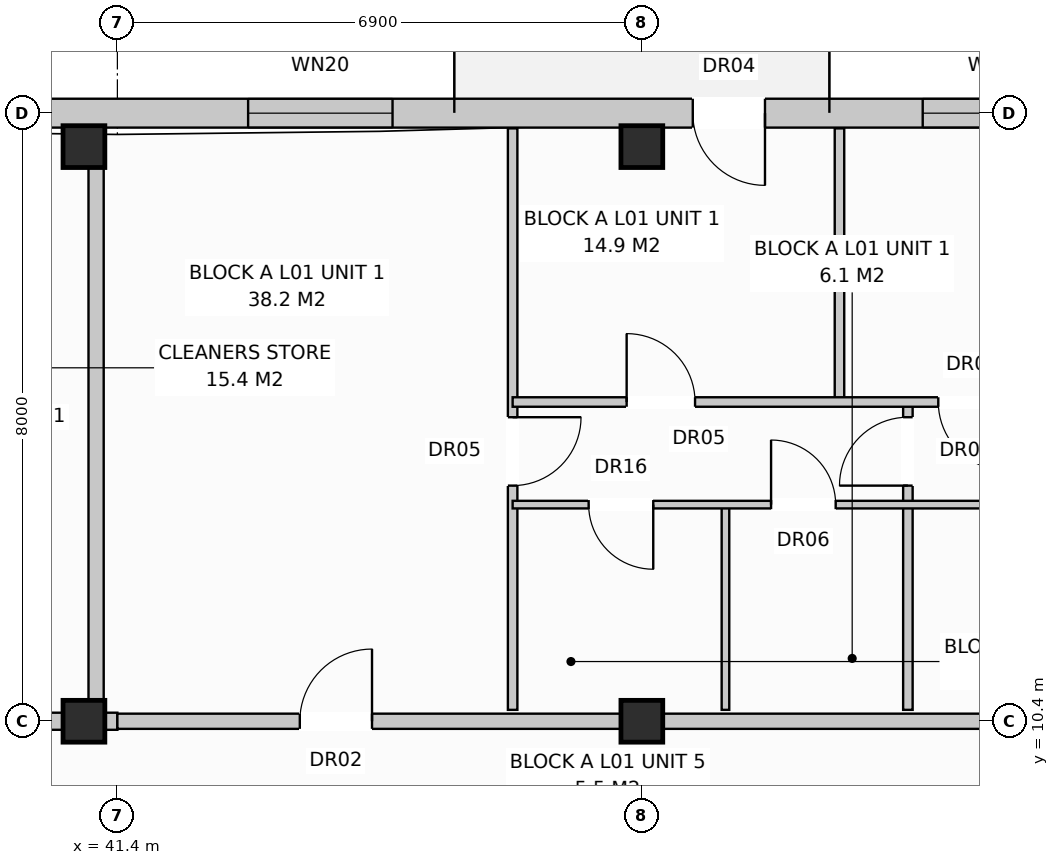
"""IFC4 building model, lengths in metres.
Left out: names, types, materials, properties, quantities, classifications, styles, units other than length and angle.
Written with IfcOpenShell. Run it as: python <this file> out.ifc"""

import sys

from ifc_helpers import new_model, si_unit, direction, frame, frame_2d, origin, origin_with_axes, origin_2d, place, context, subcontext, project, spatial, rectangle, extrude, element, fill, save


model = new_model("IFC4")
c1 = context("Model", 3, precision=1e-05, world=origin(), true_north=direction((0.0, 1.0)))
c2 = subcontext(c1, "Body", "Model", "MODEL_VIEW")
j1 = project(units=[si_unit("LENGTHUNIT", "METRE"), si_unit("PLANEANGLEUNIT", "RADIAN")], contexts=[c1])
p1 = place(None, origin())
s1 = spatial("IfcSite", under=j1, at=p1, CompositionType="ELEMENT")
p2 = place(p1, origin())
s2 = spatial("IfcBuilding", under=s1, at=p2, CompositionType="ELEMENT")
p3 = place(p2, frame((0.0, 0.0, 4.4)))
s3 = spatial("IfcBuildingStorey", under=s2, at=p3, CompositionType="ELEMENT", Elevation=4.4)
for number, where, z_axis, x_axis in (
    (1, (40.96, 10.4, 0.0), (0.0, 0.0, 1.0), (1.0, 0.0, 0.0)),
    (2, (40.96, 17.96, 0.0), (0.0, 0.0, 1.0), (1.0, 0.0, 0.0)),
    (3, (48.3, 10.4, 0.0), (0.0, 0.0, 1.0), (1.0, 0.0, 0.0)),
    (4, (48.3, 17.96, 0.0), (0.0, 0.0, 1.0), (1.0, 0.0, 0.0)),
):
    element("IfcColumn", number, at=place(p3, frame(where, z_axis=z_axis, x_axis=x_axis)), inside=s3, PredefinedType="COLUMN", context=c2, shape_type="SweptSolid", body=[
        extrude(rectangle(XDim=0.55, YDim=0.55, at=origin_2d()), origin(), (0.0, 0.0, 1.0), 3.6),
    ])
p4 = place(p3, frame((31.35, 18.4, 0.0), z_axis=(0.0, 0.0, 1.0), x_axis=(1.0, 0.0, 0.0)))
e5 = element("IfcWall", 5, at=p4, inside=s3, PredefinedType="STANDARD", context=c2, shape_type="SweptSolid", body=[
    extrude(rectangle(XDim=23.67, YDim=0.38, at=frame_2d((11.835, 0.0))), origin(), (0.0, 0.0, 1.0), 3.33),
])
p5 = place(p4, frame((17.62, 0.0, 0.0)))
e6 = element("IfcOpeningElement", 6, at=p5, cuts=e5, PredefinedType="OPENING", context=c2, shape_type="SweptSolid", body=[
    extrude(rectangle(XDim=0.95, YDim=2.1, at=frame_2d((0.475, 1.05))), frame((0.0, 0.202, 0.0), z_axis=(0.0, -1.0, 0.0), x_axis=(1.0, 0.0, 0.0)), (0.0, 0.0, 1.0), 0.404),
])
p6 = place(p4, frame((11.77, 0.0, 0.8)))
e7 = element("IfcOpeningElement", 7, at=p6, cuts=e5, PredefinedType="OPENING", context=c2, shape_type="SweptSolid", body=[
    extrude(rectangle(XDim=1.9, YDim=1.85, at=frame_2d((0.95, 0.925))), frame((0.0, 0.202, 0.0), z_axis=(0.0, -1.0, 0.0), x_axis=(1.0, 0.0, 0.0)), (0.0, 0.0, 1.0), 0.404),
])
p7 = place(p4, frame((20.645, 0.0, 0.8)))
e8 = element("IfcOpeningElement", 8, at=p7, cuts=e5, PredefinedType="OPENING", context=c2, shape_type="SweptSolid", body=[
    extrude(rectangle(XDim=1.95, YDim=1.65, at=frame_2d((0.975, 0.825))), frame((0.0, 0.202, 0.0), z_axis=(0.0, -1.0, 0.0), x_axis=(1.0, 0.0, 0.0)), (0.0, 0.0, 1.0), 0.404),
])
p8 = place(p3, frame((41.12, 10.6, 0.0), z_axis=(0.0, 0.0, 1.0), x_axis=(0.0, 1.0, 0.0)))
e9 = element("IfcWall", 9, at=p8, inside=s3, PredefinedType="PARTITIONING", context=c2, shape_type="SweptSolid", body=[
    extrude(rectangle(XDim=7.6, YDim=0.2, at=frame_2d((3.8, 0.0))), origin(), (0.0, 0.0, 1.0), 3.33),
])
p9 = place(p3, frame((31.5, 10.4, 0.0), z_axis=(0.0, 0.0, 1.0), x_axis=(1.0, 0.0, 0.0)))
e10 = element("IfcWall", 10, at=p9, inside=s3, PredefinedType="PARTITIONING", context=c2, shape_type="SweptSolid", body=[
    extrude(rectangle(XDim=9.9, YDim=0.225, at=frame_2d((4.95, 0.0))), origin(), (0.0, 0.0, 1.0), 2.77),
])
p10 = place(p9, frame((0.475, 0.0, 0.0)))
e11 = element("IfcOpeningElement", 11, at=p10, cuts=e10, PredefinedType="OPENING", context=c2, shape_type="SweptSolid", body=[
    extrude(rectangle(XDim=1.1, YDim=2.15, at=frame_2d((0.55, 1.075))), frame((0.0, 0.125, 0.0), z_axis=(0.0, -1.0, 0.0), x_axis=(1.0, 0.0, 0.0)), (0.0, 0.0, 1.0), 0.249),
])
p11 = place(p9, frame((5.75, 0.0, 0.0)))
e12 = element("IfcOpeningElement", 12, at=p11, cuts=e10, PredefinedType="OPENING", context=c2, shape_type="SweptSolid", body=[
    extrude(rectangle(XDim=0.9, YDim=2.1, at=frame_2d((0.45, 1.05))), frame((0.0, 0.125, 0.0), z_axis=(0.0, -1.0, 0.0), x_axis=(1.0, 0.0, 0.0)), (0.0, 0.0, 1.0), 0.249),
])
p12 = place(p9, frame((7.8, 0.0, 0.0)))
e13 = element("IfcOpeningElement", 13, at=p12, cuts=e10, PredefinedType="OPENING", context=c2, shape_type="SweptSolid", body=[
    extrude(rectangle(XDim=0.95, YDim=2.15, at=frame_2d((0.475, 1.075))), frame((0.0, 0.125, 0.0), z_axis=(0.0, -1.0, 0.0), x_axis=(1.0, 0.0, 0.0)), (0.0, 0.0, 1.0), 0.249),
])
p13 = place(p3, frame((41.4, 10.4, 0.0), z_axis=(0.0, 0.0, 1.0), x_axis=(1.0, 0.0, 0.0)))
e14 = element("IfcWall", 14, at=p13, inside=s3, PredefinedType="PARTITIONING", context=c2, shape_type="SweptSolid", body=[
    extrude(rectangle(XDim=13.8, YDim=0.2, at=frame_2d((6.9, 0.0))), origin(), (0.0, 0.0, 1.0), 2.77),
])
p14 = place(p13, frame((2.4, 0.0, 0.0)))
e15 = element("IfcOpeningElement", 15, at=p14, cuts=e14, PredefinedType="OPENING", context=c2, shape_type="SweptSolid", body=[
    extrude(rectangle(XDim=0.95, YDim=2.15, at=frame_2d((0.475, 1.075))), frame((0.0, 0.112, 0.0), z_axis=(0.0, -1.0, 0.0), x_axis=(1.0, 0.0, 0.0)), (0.0, 0.0, 1.0), 0.224),
])
p15 = place(p3, frame((46.6, 10.55, 0.0), z_axis=(0.0, 0.0, 1.0), x_axis=(0.0, 1.0, 0.0)))
e16 = element("IfcWall", 16, at=p15, inside=s3, PredefinedType="PARTITIONING", context=c2, shape_type="SweptSolid", body=[
    extrude(rectangle(XDim=7.65, YDim=0.125, at=frame_2d((3.825, 0.0))), origin(), (0.0, 0.0, 1.0), 3.33),
])
p16 = place(p15, frame((2.95, 0.0, 0.0)))
e17 = element("IfcOpeningElement", 17, at=p16, cuts=e16, PredefinedType="OPENING", context=c2, shape_type="SweptSolid", body=[
    extrude(rectangle(XDim=0.9, YDim=2.1, at=frame_2d((0.45, 1.05))), frame((0.0, 0.074, 0.0), z_axis=(0.0, -1.0, 0.0), x_axis=(1.0, 0.0, 0.0)), (0.0, 0.0, 1.0), 0.149),
])
p17 = place(p3, frame((49.4, 10.55, 0.0), z_axis=(0.0, 0.0, 1.0), x_axis=(0.0, 1.0, 0.0)))
e18 = element("IfcWall", 18, at=p17, inside=s3, PredefinedType="PARTITIONING", context=c2, shape_type="SweptSolid", body=[
    extrude(rectangle(XDim=2.7, YDim=0.1, at=frame_2d((1.35, 0.0))), origin(), (0.0, 0.0, 1.0), 3.33),
])
p18 = place(p3, frame((51.8, 10.55, 0.0), z_axis=(0.0, 0.0, 1.0), x_axis=(0.0, 1.0, 0.0)))
e19 = element("IfcWall", 19, at=p18, inside=s3, PredefinedType="PARTITIONING", context=c2, shape_type="SweptSolid", body=[
    extrude(rectangle(XDim=4.05, YDim=0.125, at=frame_2d((2.025, 0.0))), origin(), (0.0, 0.0, 1.0), 3.33),
])
p19 = place(p18, frame((2.95, 0.0, 0.0)))
e20 = element("IfcOpeningElement", 20, at=p19, cuts=e19, PredefinedType="OPENING", context=c2, shape_type="SweptSolid", body=[
    extrude(rectangle(XDim=0.9, YDim=2.1, at=frame_2d((0.45, 1.05))), frame((0.0, 0.074, 0.0), z_axis=(0.0, -1.0, 0.0), x_axis=(1.0, 0.0, 0.0)), (0.0, 0.0, 1.0), 0.149),
])
p20 = place(p3, frame((50.9, 14.6, 0.0), z_axis=(0.0, 0.0, 1.0), x_axis=(0.0, 1.0, 0.0)))
e21 = element("IfcWall", 21, at=p20, inside=s3, PredefinedType="PARTITIONING", context=c2, shape_type="SweptSolid", body=[
    extrude(rectangle(XDim=3.6, YDim=0.125, at=frame_2d((1.8, 0.0))), origin(), (0.0, 0.0, 1.0), 3.33),
])
p21 = place(p3, frame((46.6, 13.25, 0.0), z_axis=(0.0, 0.0, 1.0), x_axis=(1.0, 0.0, 0.0)))
e22 = element("IfcWall", 22, at=p21, inside=s3, PredefinedType="PARTITIONING", context=c2, shape_type="SweptSolid", body=[
    extrude(rectangle(XDim=8.5, YDim=0.1, at=frame_2d((4.25, 0.0))), origin(), (0.0, 0.0, 1.0), 3.33),
])
p22 = place(p21, frame((1.0, 0.0, 0.0)))
e23 = element("IfcOpeningElement", 23, at=p22, cuts=e22, PredefinedType="OPENING", context=c2, shape_type="SweptSolid", body=[
    extrude(rectangle(XDim=0.85, YDim=2.1, at=frame_2d((0.425, 1.05))), frame((0.0, 0.062, 0.0), z_axis=(0.0, -1.0, 0.0), x_axis=(1.0, 0.0, 0.0)), (0.0, 0.0, 1.0), 0.124),
])
p23 = place(p21, frame((3.4, 0.0, 0.0)))
e24 = element("IfcOpeningElement", 24, at=p23, cuts=e22, PredefinedType="OPENING", context=c2, shape_type="SweptSolid", body=[
    extrude(rectangle(XDim=0.85, YDim=2.05, at=frame_2d((0.425, 1.025))), frame((0.0, 0.062, 0.0), z_axis=(0.0, -1.0, 0.0), x_axis=(1.0, 0.0, 0.0)), (0.0, 0.0, 1.0), 0.124),
])
p24 = place(p21, frame((6.2, 0.0, 0.0)))
e25 = element("IfcOpeningElement", 25, at=p24, cuts=e22, PredefinedType="OPENING", context=c2, shape_type="SweptSolid", body=[
    extrude(rectangle(XDim=0.85, YDim=2.05, at=frame_2d((0.425, 1.025))), frame((0.0, 0.062, 0.0), z_axis=(0.0, -1.0, 0.0), x_axis=(1.0, 0.0, 0.0)), (0.0, 0.0, 1.0), 0.124),
])
p25 = place(p3, frame((46.6, 14.6, 0.0), z_axis=(0.0, 0.0, 1.0), x_axis=(1.0, 0.0, 0.0)))
e26 = element("IfcWall", 26, at=p25, inside=s3, PredefinedType="PARTITIONING", context=c2, shape_type="SweptSolid", body=[
    extrude(rectangle(XDim=8.5, YDim=0.125, at=frame_2d((4.25, 0.0))), origin(), (0.0, 0.0, 1.0), 3.33),
])
p26 = place(p25, frame((1.5, 0.0, 0.0)))
e27 = element("IfcOpeningElement", 27, at=p26, cuts=e26, PredefinedType="OPENING", context=c2, shape_type="SweptSolid", body=[
    extrude(rectangle(XDim=0.9, YDim=2.1, at=frame_2d((0.45, 1.05))), frame((0.0, 0.074, 0.0), z_axis=(0.0, -1.0, 0.0), x_axis=(1.0, 0.0, 0.0)), (0.0, 0.0, 1.0), 0.149),
])
p27 = place(p25, frame((5.6, 0.0, 0.0)))
e28 = element("IfcOpeningElement", 28, at=p27, cuts=e26, PredefinedType="OPENING", context=c2, shape_type="SweptSolid", body=[
    extrude(rectangle(XDim=0.9, YDim=2.1, at=frame_2d((0.45, 1.05))), frame((0.0, 0.074, 0.0), z_axis=(0.0, -1.0, 0.0), x_axis=(1.0, 0.0, 0.0)), (0.0, 0.0, 1.0), 0.149),
])
p28 = place(p5, frame((0.95, 0.0, 0.0), z_axis=(0.0, 0.0, 1.0), x_axis=(-1.0, 0.0, 0.0)))
e29 = element("IfcDoor", 29, at=p28, inside=s3, OperationType="SINGLE_SWING_RIGHT", PredefinedType="DOOR", context=c2, shape_type="SweptSolid", body=[
    extrude(rectangle(XDim=0.95, YDim=2.1, at=frame_2d((0.475, 1.05))), frame((0.0, 0.025, 0.0), z_axis=(0.0, -1.0, 0.0), x_axis=(1.0, 0.0, 0.0)), (0.0, 0.0, 1.0), 0.05),
])
fill(e6, e29)
p29 = place(p6, origin_with_axes())
e30 = element("IfcWindow", 30, at=p29, inside=s3, PartitioningType="SINGLE_PANEL", PredefinedType="WINDOW", context=c2, shape_type="SweptSolid", body=[
    extrude(rectangle(XDim=1.9, YDim=1.85, at=frame_2d((0.95, 0.925))), frame((0.0, 0.03, 0.0), z_axis=(0.0, -1.0, 0.0), x_axis=(1.0, 0.0, 0.0)), (0.0, 0.0, 1.0), 0.06),
])
fill(e7, e30)
p30 = place(p7, origin_with_axes())
e31 = element("IfcWindow", 31, at=p30, inside=s3, PartitioningType="SINGLE_PANEL", PredefinedType="WINDOW", context=c2, shape_type="SweptSolid", body=[
    extrude(rectangle(XDim=1.95, YDim=1.65, at=frame_2d((0.975, 0.825))), frame((0.0, 0.03, 0.0), z_axis=(0.0, -1.0, 0.0), x_axis=(1.0, 0.0, 0.0)), (0.0, 0.0, 1.0), 0.06),
])
fill(e8, e31)
p31 = place(p14, origin_with_axes())
e32 = element("IfcDoor", 32, at=p31, inside=s3, OperationType="SINGLE_SWING_RIGHT", PredefinedType="DOOR", context=c2, shape_type="SweptSolid", body=[
    extrude(rectangle(XDim=0.95, YDim=2.15, at=frame_2d((0.475, 1.075))), frame((0.0, 0.025, 0.0), z_axis=(0.0, -1.0, 0.0), x_axis=(1.0, 0.0, 0.0)), (0.0, 0.0, 1.0), 0.05),
])
fill(e15, e32)
p32 = place(p16, frame((0.9, 0.0, 0.0), z_axis=(0.0, 0.0, 1.0), x_axis=(-1.0, 0.0, 0.0)))
e33 = element("IfcDoor", 33, at=p32, inside=s3, OperationType="SINGLE_SWING_RIGHT", PredefinedType="DOOR", context=c2, shape_type="SweptSolid", body=[
    extrude(rectangle(XDim=0.9, YDim=2.1, at=frame_2d((0.45, 1.05))), frame((0.0, 0.025, 0.0), z_axis=(0.0, -1.0, 0.0), x_axis=(1.0, 0.0, 0.0)), (0.0, 0.0, 1.0), 0.05),
])
fill(e17, e33)
p33 = place(p19, origin_with_axes())
e34 = element("IfcDoor", 34, at=p33, inside=s3, OperationType="SINGLE_SWING_LEFT", PredefinedType="DOOR", context=c2, shape_type="SweptSolid", body=[
    extrude(rectangle(XDim=0.9, YDim=2.1, at=frame_2d((0.45, 1.05))), frame((0.0, 0.025, 0.0), z_axis=(0.0, -1.0, 0.0), x_axis=(1.0, 0.0, 0.0)), (0.0, 0.0, 1.0), 0.05),
])
fill(e20, e34)
p34 = place(p22, frame((0.85, 0.0, 0.0), z_axis=(0.0, 0.0, 1.0), x_axis=(-1.0, 0.0, 0.0)))
e35 = element("IfcDoor", 35, at=p34, inside=s3, OperationType="SINGLE_SWING_RIGHT", PredefinedType="DOOR", context=c2, shape_type="SweptSolid", body=[
    extrude(rectangle(XDim=0.85, YDim=2.1, at=frame_2d((0.425, 1.05))), frame((0.0, 0.025, 0.0), z_axis=(0.0, -1.0, 0.0), x_axis=(1.0, 0.0, 0.0)), (0.0, 0.0, 1.0), 0.05),
])
fill(e23, e35)
p35 = place(p23, origin_with_axes())
e36 = element("IfcDoor", 36, at=p35, inside=s3, OperationType="SINGLE_SWING_LEFT", PredefinedType="DOOR", context=c2, shape_type="SweptSolid", body=[
    extrude(rectangle(XDim=0.85, YDim=2.05, at=frame_2d((0.425, 1.025))), frame((0.0, 0.025, 0.0), z_axis=(0.0, -1.0, 0.0), x_axis=(1.0, 0.0, 0.0)), (0.0, 0.0, 1.0), 0.05),
])
fill(e24, e36)
p36 = place(p26, origin_with_axes())
e37 = element("IfcDoor", 37, at=p36, inside=s3, OperationType="SINGLE_SWING_LEFT", PredefinedType="DOOR", context=c2, shape_type="SweptSolid", body=[
    extrude(rectangle(XDim=0.9, YDim=2.1, at=frame_2d((0.45, 1.05))), frame((0.0, 0.025, 0.0), z_axis=(0.0, -1.0, 0.0), x_axis=(1.0, 0.0, 0.0)), (0.0, 0.0, 1.0), 0.05),
])
fill(e27, e37)
p37 = place(p27, frame((0.9, 0.0, 0.0), z_axis=(0.0, 0.0, 1.0), x_axis=(-1.0, 0.0, 0.0)))
e38 = element("IfcDoor", 38, at=p37, inside=s3, OperationType="SINGLE_SWING_RIGHT", PredefinedType="DOOR", context=c2, shape_type="SweptSolid", body=[
    extrude(rectangle(XDim=0.9, YDim=2.1, at=frame_2d((0.45, 1.05))), frame((0.0, 0.025, 0.0), z_axis=(0.0, -1.0, 0.0), x_axis=(1.0, 0.0, 0.0)), (0.0, 0.0, 1.0), 0.05),
])
fill(e28, e38)
save(model, sys.argv[1])
